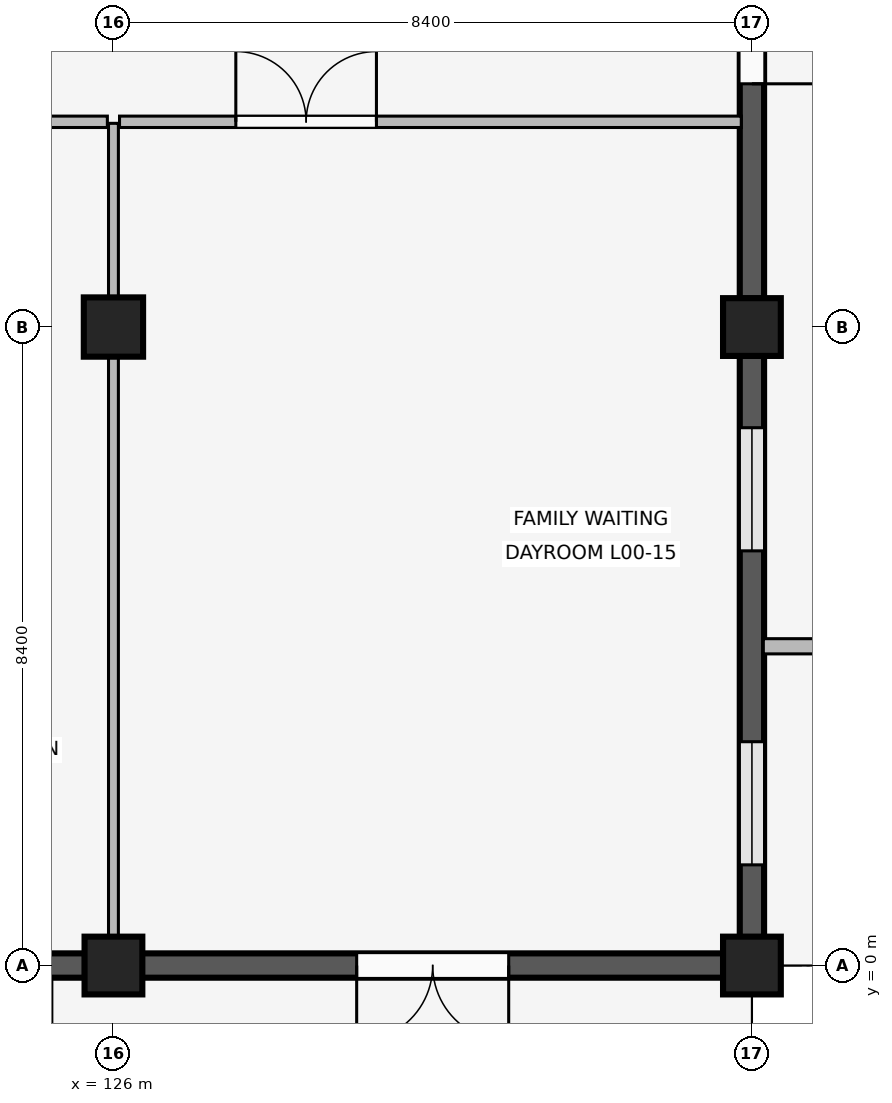
"""IFC4 building model, lengths in metres.
Left out: names, types, materials, properties, quantities, classifications, styles, units other than length and angle.
Written with IfcOpenShell. Run it as: python <this file> out.ifc"""

import sys

from ifc_helpers import new_model, si_unit, direction, frame, frame_2d, origin, origin_2d, place, context, subcontext, project, spatial, rectangle, extrude, element, fill, save


model = new_model("IFC4")
c1 = context("Model", 3, precision=1e-05, world=origin(), true_north=direction((0.0, 1.0)))
c2 = subcontext(c1, "Body", "Model", "MODEL_VIEW")
j1 = project(units=[si_unit("LENGTHUNIT", "METRE"), si_unit("PLANEANGLEUNIT", "RADIAN")], contexts=[c1])
p1 = place(None, origin())
s1 = spatial("IfcSite", under=j1, at=p1, CompositionType="ELEMENT")
p2 = place(p1, origin())
s2 = spatial("IfcBuilding", under=s1, at=p2, CompositionType="ELEMENT")
p3 = place(p2, origin())
s3 = spatial("IfcBuildingStorey", under=s2, at=p3, CompositionType="ELEMENT", Elevation=0.0)
p4 = place(p3, frame((126.0, 0.0, 0.0), z_axis=(0.0, 0.0, 1.0), x_axis=(1.0, 0.0, 0.0)))
e1 = element("IfcColumn", 1, at=p4, inside=s3, PredefinedType="COLUMN", context=c2, shape_type="SweptSolid", body=[
    extrude(rectangle(XDim=0.76, YDim=0.76, at=origin_2d()), origin(), (0.0, 0.0, 1.0), 4.8),
])
p5 = place(p3, frame((126.0, 8.4, 0.0), z_axis=(0.0, 0.0, 1.0), x_axis=(1.0, 0.0, 0.0)))
e2 = element("IfcColumn", 2, at=p5, inside=s3, PredefinedType="COLUMN", context=c2, shape_type="SweptSolid", body=[
    extrude(rectangle(XDim=0.78, YDim=0.78, at=origin_2d()), origin(), (0.0, 0.0, 1.0), 4.8),
])
for number, where, z_axis, x_axis in (
    (3, (134.4, 0.0, 0.0), (0.0, 0.0, 1.0), (1.0, 0.0, 0.0)),
    (4, (134.4, 8.4, 0.0), (0.0, 0.0, 1.0), (1.0, 0.0, 0.0)),
):
    element("IfcColumn", number, at=place(p3, frame(where, z_axis=z_axis, x_axis=x_axis)), inside=s3, PredefinedType="COLUMN", context=c2, shape_type="SweptSolid", body=[
        extrude(rectangle(XDim=0.76, YDim=0.76, at=origin_2d()), origin(), (0.0, 0.0, 1.0), 4.8),
    ])
p6 = place(p3, frame((125.625, 0.0, 0.0), z_axis=(0.0, 0.0, 1.0), x_axis=(-1.0, 0.0, 0.0)))
e5 = element("IfcWall", 5, at=p6, inside=s3, PredefinedType="SOLIDWALL", context=c2, shape_type="SweptSolid", body=[
    extrude(rectangle(XDim=7.65, YDim=0.32, at=frame_2d((3.825, 0.0))), origin(), (0.0, 0.0, 1.0), 3.82),
])
p7 = place(p6, frame((0.979, 0.0, 0.85)))
e6 = element("IfcOpeningElement", 6, at=p7, cuts=e5, PredefinedType="OPENING", context=c2, shape_type="SweptSolid", body=[
    extrude(rectangle(XDim=1.56, YDim=1.7, at=frame_2d((0.78, 0.85))), frame((0.0, 0.17, 0.0), z_axis=(0.0, -1.0, 0.0), x_axis=(1.0, 0.0, 0.0)), (0.0, 0.0, 1.0), 0.34),
])
p8 = place(p6, frame((5.111, 0.0, 0.85)))
e7 = element("IfcOpeningElement", 7, at=p8, cuts=e5, PredefinedType="OPENING", context=c2, shape_type="SweptSolid", body=[
    extrude(rectangle(XDim=1.56, YDim=1.7, at=frame_2d((0.78, 0.85))), frame((0.0, 0.17, 0.0), z_axis=(0.0, -1.0, 0.0), x_axis=(1.0, 0.0, 0.0)), (0.0, 0.0, 1.0), 0.34),
])
p9 = place(p3, frame((134.025, 0.0, 0.0), z_axis=(0.0, 0.0, 1.0), x_axis=(-1.0, 0.0, 0.0)))
e8 = element("IfcWall", 8, at=p9, inside=s3, PredefinedType="SOLIDWALL", context=c2, shape_type="SweptSolid", body=[
    extrude(rectangle(XDim=7.65, YDim=0.32, at=frame_2d((3.825, 0.0))), origin(), (0.0, 0.0, 1.0), 3.82),
])
p10 = place(p9, frame((2.825, 0.0, 0.0)))
e9 = element("IfcOpeningElement", 9, at=p10, cuts=e8, PredefinedType="OPENING", context=c2, shape_type="SweptSolid", body=[
    extrude(rectangle(XDim=2.0, YDim=2.4, at=frame_2d((1.0, 1.2))), frame((0.0, 0.17, 0.0), z_axis=(0.0, -1.0, 0.0), x_axis=(1.0, 0.0, 0.0)), (0.0, 0.0, 1.0), 0.34),
])
p11 = place(p3, frame((134.4, 8.025, 0.0), z_axis=(0.0, 0.0, 1.0), x_axis=(0.0, -1.0, 0.0)))
e10 = element("IfcWall", 10, at=p11, inside=s3, PredefinedType="SOLIDWALL", context=c2, shape_type="SweptSolid", body=[
    extrude(rectangle(XDim=7.65, YDim=0.32, at=frame_2d((3.825, 0.0))), origin(), (0.0, 0.0, 1.0), 3.82),
])
p12 = place(p11, frame((0.949, 0.0, 0.85)))
e11 = element("IfcOpeningElement", 11, at=p12, cuts=e10, PredefinedType="OPENING", context=c2, shape_type="SweptSolid", body=[
    extrude(rectangle(XDim=1.62, YDim=1.8, at=frame_2d((0.81, 0.9))), frame((0.0, 0.17, 0.0), z_axis=(0.0, -1.0, 0.0), x_axis=(1.0, 0.0, 0.0)), (0.0, 0.0, 1.0), 0.34),
])
p13 = place(p11, frame((5.081, 0.0, 0.85)))
e12 = element("IfcOpeningElement", 12, at=p13, cuts=e10, PredefinedType="OPENING", context=c2, shape_type="SweptSolid", body=[
    extrude(rectangle(XDim=1.62, YDim=1.8, at=frame_2d((0.81, 0.9))), frame((0.0, 0.17, 0.0), z_axis=(0.0, -1.0, 0.0), x_axis=(1.0, 0.0, 0.0)), (0.0, 0.0, 1.0), 0.34),
])
p14 = place(p3, frame((134.55, 4.2, 0.0), z_axis=(0.0, 0.0, 1.0), x_axis=(1.0, 0.0, 0.0)))
e13 = element("IfcWall", 13, at=p14, inside=s3, PredefinedType="ELEMENTEDWALL", context=c2, shape_type="SweptSolid", body=[
    extrude(rectangle(XDim=0.85, YDim=0.2, at=frame_2d((0.425, 0.0))), origin(), (0.0, 0.0, 1.0), 3.8),
])
p15 = place(p3, frame((134.4, 16.425, 0.0), z_axis=(0.0, 0.0, 1.0), x_axis=(0.0, -1.0, 0.0)))
e14 = element("IfcWall", 14, at=p15, inside=s3, PredefinedType="SOLIDWALL", context=c2, shape_type="SweptSolid", body=[
    extrude(rectangle(XDim=7.65, YDim=0.32, at=frame_2d((3.825, 0.0))), origin(), (0.0, 0.0, 1.0), 3.82),
])
p16 = place(p15, frame((2.825, 0.0, 0.0)))
e15 = element("IfcOpeningElement", 15, at=p16, cuts=e14, PredefinedType="OPENING", context=c2, shape_type="SweptSolid", body=[
    extrude(rectangle(XDim=2.0, YDim=2.4, at=frame_2d((1.0, 1.2))), frame((0.0, 0.17, 0.0), z_axis=(0.0, -1.0, 0.0), x_axis=(1.0, 0.0, 0.0)), (0.0, 0.0, 1.0), 0.34),
])
p17 = place(p3, frame((117.68, 11.1, 0.0), z_axis=(0.0, 0.0, 1.0), x_axis=(1.0, 0.0, 0.0)))
e16 = element("IfcWall", 16, at=p17, inside=s3, PredefinedType="PARTITIONING", context=c2, shape_type="SweptSolid", body=[
    extrude(rectangle(XDim=8.24, YDim=0.15, at=frame_2d((4.12, 0.0))), origin(), (0.0, 0.0, 1.0), 3.8),
])
p18 = place(p17, frame((2.53, 0.0, 0.0)))
e17 = element("IfcOpeningElement", 17, at=p18, cuts=e16, PredefinedType="OPENING", context=c2, shape_type="SweptSolid", body=[
    extrude(rectangle(XDim=1.05, YDim=2.2, at=frame_2d((0.525, 1.1))), frame((0.0, 0.085, 0.0), z_axis=(0.0, -1.0, 0.0), x_axis=(1.0, 0.0, 0.0)), (0.0, 0.0, 1.0), 0.17),
])
p19 = place(p17, frame((6.23, 0.0, 0.0)))
e18 = element("IfcOpeningElement", 18, at=p19, cuts=e16, PredefinedType="OPENING", context=c2, shape_type="SweptSolid", body=[
    extrude(rectangle(XDim=1.05, YDim=2.2, at=frame_2d((0.525, 1.1))), frame((0.0, 0.085, 0.0), z_axis=(0.0, -1.0, 0.0), x_axis=(1.0, 0.0, 0.0)), (0.0, 0.0, 1.0), 0.17),
])
p20 = place(p3, frame((126.0, 0.14, 0.0), z_axis=(0.0, 0.0, 1.0), x_axis=(0.0, 1.0, 0.0)))
e19 = element("IfcWall", 19, at=p20, inside=s3, PredefinedType="PARTITIONING", context=c2, shape_type="SweptSolid", body=[
    extrude(rectangle(XDim=10.94, YDim=0.13, at=frame_2d((5.47, 0.0))), origin(), (0.0, 0.0, 1.0), 3.8),
])
p21 = place(p3, frame((126.08, 11.1, 0.0), z_axis=(0.0, 0.0, 1.0), x_axis=(1.0, 0.0, 0.0)))
e20 = element("IfcWall", 20, at=p21, inside=s3, PredefinedType="PARTITIONING", context=c2, shape_type="SweptSolid", body=[
    extrude(rectangle(XDim=8.18, YDim=0.15, at=frame_2d((4.09, 0.0))), origin(), (0.0, 0.0, 1.0), 3.8),
])
p22 = place(p21, frame((1.53, 0.0, 0.0)))
e21 = element("IfcOpeningElement", 21, at=p22, cuts=e20, PredefinedType="OPENING", context=c2, shape_type="SweptSolid", body=[
    extrude(rectangle(XDim=1.85, YDim=2.3, at=frame_2d((0.925, 1.15))), frame((0.0, 0.085, 0.0), z_axis=(0.0, -1.0, 0.0), x_axis=(1.0, 0.0, 0.0)), (0.0, 0.0, 1.0), 0.17),
])
p23 = place(p10, origin())
e22 = element("IfcDoor", 22, at=p23, inside=s3, OperationType="DOUBLE_SWING_LEFT", PredefinedType="DOOR", context=c2, shape_type="SweptSolid", body=[
    extrude(rectangle(XDim=2.0, YDim=2.4, at=frame_2d((1.0, 1.2))), frame((0.0, 0.025, 0.0), z_axis=(0.0, -1.0, 0.0), x_axis=(1.0, 0.0, 0.0)), (0.0, 0.0, 1.0), 0.05),
])
fill(e9, e22)
p24 = place(p12, origin())
e23 = element("IfcWindow", 23, at=p24, inside=s3, PartitioningType="SINGLE_PANEL", PredefinedType="WINDOW", context=c2, shape_type="SweptSolid", body=[
    extrude(rectangle(XDim=1.62, YDim=1.8, at=frame_2d((0.81, 0.9))), frame((0.0, 0.03, 0.0), z_axis=(0.0, -1.0, 0.0), x_axis=(1.0, 0.0, 0.0)), (0.0, 0.0, 1.0), 0.06),
])
fill(e11, e23)
p25 = place(p13, origin())
e24 = element("IfcWindow", 24, at=p25, inside=s3, PartitioningType="SINGLE_PANEL", PredefinedType="WINDOW", context=c2, shape_type="SweptSolid", body=[
    extrude(rectangle(XDim=1.62, YDim=1.8, at=frame_2d((0.81, 0.9))), frame((0.0, 0.03, 0.0), z_axis=(0.0, -1.0, 0.0), x_axis=(1.0, 0.0, 0.0)), (0.0, 0.0, 1.0), 0.06),
])
fill(e12, e24)
p26 = place(p16, origin())
e25 = element("IfcDoor", 25, at=p26, inside=s3, OperationType="DOUBLE_SWING_LEFT", PredefinedType="DOOR", context=c2, shape_type="SweptSolid", body=[
    extrude(rectangle(XDim=2.0, YDim=2.4, at=frame_2d((1.0, 1.2))), frame((0.0, 0.025, 0.0), z_axis=(0.0, -1.0, 0.0), x_axis=(1.0, 0.0, 0.0)), (0.0, 0.0, 1.0), 0.05),
])
fill(e15, e25)
p27 = place(p22, origin())
e26 = element("IfcDoor", 26, at=p27, inside=s3, OperationType="DOUBLE_SWING_LEFT", PredefinedType="DOOR", context=c2, shape_type="SweptSolid", body=[
    extrude(rectangle(XDim=1.85, YDim=2.3, at=frame_2d((0.925, 1.15))), frame((0.0, 0.025, 0.0), z_axis=(0.0, -1.0, 0.0), x_axis=(1.0, 0.0, 0.0)), (0.0, 0.0, 1.0), 0.05),
])
fill(e21, e26)
save(model, sys.argv[1])
